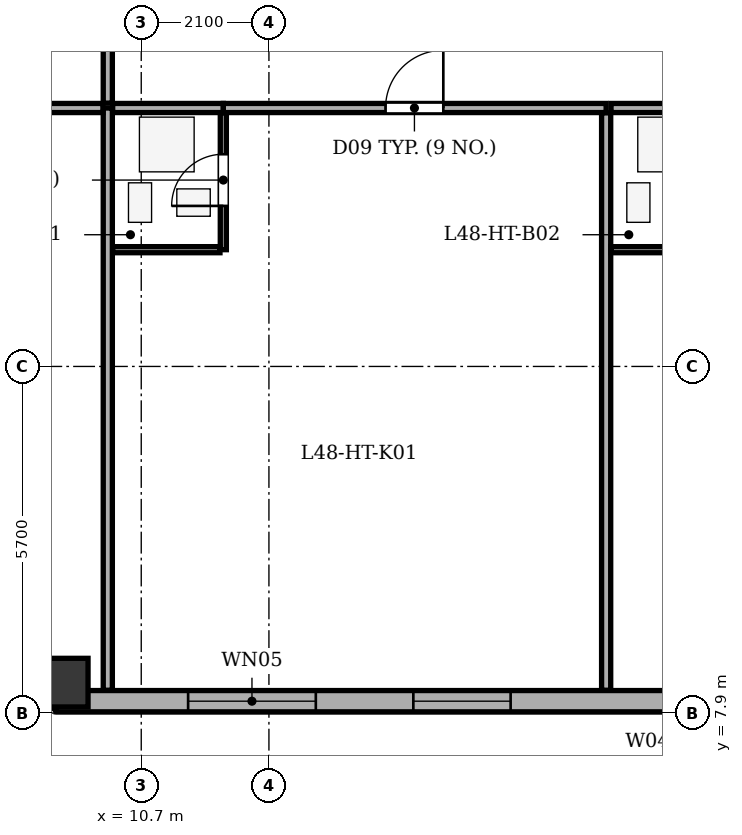
"""IFC4 building model, lengths in metres.
Left out: names, types, materials, properties, quantities, classifications, styles, units other than length and angle.
Written with IfcOpenShell. Run it as: python <this file> out.ifc"""

import sys

from ifc_helpers import new_model, si_unit, direction, frame, frame_2d, origin, origin_2d, place, context, subcontext, project, spatial, rectangle, extrude, element, fill, save


model = new_model("IFC4")
c1 = context("Model", 3, precision=1e-05, world=origin(), true_north=direction((0.0, 1.0)))
c2 = subcontext(c1, "Body", "Model", "MODEL_VIEW")
j1 = project(units=[si_unit("LENGTHUNIT", "METRE"), si_unit("PLANEANGLEUNIT", "RADIAN")], contexts=[c1])
p1 = place(None, origin())
s1 = spatial("IfcSite", under=j1, at=p1, CompositionType="ELEMENT")
p2 = place(p1, origin())
s2 = spatial("IfcBuilding", under=s1, at=p2, CompositionType="ELEMENT")
p3 = place(p2, frame((0.0, 0.0, 186.8)))
s3 = spatial("IfcBuildingStorey", under=s2, at=p3, CompositionType="ELEMENT", Elevation=186.8)
p4 = place(p3, frame((9.3, 8.4, 0.0), z_axis=(0.0, 0.0, 1.0), x_axis=(1.0, 0.0, 0.0)))
e1 = element("IfcColumn", 1, at=p4, inside=s3, PredefinedType="COLUMN", context=c2, shape_type="SweptSolid", body=[
    extrude(rectangle(XDim=0.8, YDim=1.05, at=origin_2d()), origin(), (0.0, 0.0, 1.0), 3.5),
])
p5 = place(p3, frame((44.3, 8.095, 0.0), z_axis=(0.0, 0.0, 1.0), x_axis=(-1.0, 0.0, 0.0)))
e2 = element("IfcWall", 2, at=p5, inside=s3, PredefinedType="STANDARD", context=c2, shape_type="SweptSolid", body=[
    extrude(rectangle(XDim=35.0, YDim=0.35, at=frame_2d((17.5, 0.0))), origin(), (0.0, 0.0, 1.0), 2.785),
])
p6 = place(p5, frame((19.6, 0.0, 0.0)))
e3 = element("IfcOpeningElement", 3, at=p6, cuts=e2, PredefinedType="OPENING", context=c2, shape_type="SweptSolid", body=[
    extrude(rectangle(XDim=1.0, YDim=2.02, at=frame_2d((0.5, 1.01))), frame((0.0, 0.185, 0.0), z_axis=(0.0, -1.0, 0.0), x_axis=(1.0, 0.0, 0.0)), (0.0, 0.0, 1.0), 0.37),
])
p7 = place(p5, frame((1.686, 0.0, 0.75)))
e4 = element("IfcOpeningElement", 4, at=p7, cuts=e2, PredefinedType="OPENING", context=c2, shape_type="SweptSolid", body=[
    extrude(rectangle(XDim=1.6, YDim=1.75, at=frame_2d((0.8, 0.875))), frame((0.0, 0.185, 0.0), z_axis=(0.0, -1.0, 0.0), x_axis=(1.0, 0.0, 0.0)), (0.0, 0.0, 1.0), 0.37),
])
p8 = place(p5, frame((4.843, 0.0, 0.75)))
e5 = element("IfcOpeningElement", 5, at=p8, cuts=e2, PredefinedType="OPENING", context=c2, shape_type="SweptSolid", body=[
    extrude(rectangle(XDim=1.6, YDim=1.75, at=frame_2d((0.8, 0.875))), frame((0.0, 0.185, 0.0), z_axis=(0.0, -1.0, 0.0), x_axis=(1.0, 0.0, 0.0)), (0.0, 0.0, 1.0), 0.37),
])
p9 = place(p5, frame((10.496, 0.0, 0.75)))
e6 = element("IfcOpeningElement", 6, at=p9, cuts=e2, PredefinedType="OPENING", context=c2, shape_type="SweptSolid", body=[
    extrude(rectangle(XDim=1.6, YDim=1.75, at=frame_2d((0.8, 0.875))), frame((0.0, 0.185, 0.0), z_axis=(0.0, -1.0, 0.0), x_axis=(1.0, 0.0, 0.0)), (0.0, 0.0, 1.0), 0.37),
])
p10 = place(p5, frame((13.304, 0.0, 0.75)))
e7 = element("IfcOpeningElement", 7, at=p10, cuts=e2, PredefinedType="OPENING", context=c2, shape_type="SweptSolid", body=[
    extrude(rectangle(XDim=1.6, YDim=1.75, at=frame_2d((0.8, 0.875))), frame((0.0, 0.185, 0.0), z_axis=(0.0, -1.0, 0.0), x_axis=(1.0, 0.0, 0.0)), (0.0, 0.0, 1.0), 0.37),
])
p11 = place(p5, frame((27.525, 0.0, 0.75)))
e8 = element("IfcOpeningElement", 8, at=p11, cuts=e2, PredefinedType="OPENING", context=c2, shape_type="SweptSolid", body=[
    extrude(rectangle(XDim=1.6, YDim=1.75, at=frame_2d((0.8, 0.875))), frame((0.0, 0.185, 0.0), z_axis=(0.0, -1.0, 0.0), x_axis=(1.0, 0.0, 0.0)), (0.0, 0.0, 1.0), 0.37),
])
p12 = place(p5, frame((30.729, 0.0, 0.75)))
e9 = element("IfcOpeningElement", 9, at=p12, cuts=e2, PredefinedType="OPENING", context=c2, shape_type="SweptSolid", body=[
    extrude(rectangle(XDim=2.1, YDim=1.75, at=frame_2d((1.05, 0.875))), frame((0.0, 0.185, 0.0), z_axis=(0.0, -1.0, 0.0), x_axis=(1.0, 0.0, 0.0)), (0.0, 0.0, 1.0), 0.37),
])
p13 = place(p3, frame((9.3, 8.095, 0.0), z_axis=(0.0, 0.0, 1.0), x_axis=(-0.707106781187, 0.707106781187, 0.0)))
e10 = element("IfcWall", 10, at=p13, inside=s3, PredefinedType="STANDARD", context=c2, shape_type="SweptSolid", body=[
    extrude(rectangle(XDim=6.795, YDim=0.35, at=frame_2d((3.397, 0.0))), origin(), (0.0, 0.0, 1.0), 2.785),
])
p14 = place(p13, frame((2.698, 0.0, 0.75)))
e11 = element("IfcOpeningElement", 11, at=p14, cuts=e10, PredefinedType="OPENING", context=c2, shape_type="SweptSolid", body=[
    extrude(rectangle(XDim=1.4, YDim=1.65, at=frame_2d((0.7, 0.825))), frame((0.0, 0.185, 0.0), z_axis=(0.0, -1.0, 0.0), x_axis=(1.0, 0.0, 0.0)), (0.0, 0.0, 1.0), 0.37),
])
p15 = place(p3, frame((10.15, 8.275, 0.0), z_axis=(0.0, 0.0, 1.0), x_axis=(0.0, 1.0, 0.0)))
e12 = element("IfcWall", 12, at=p15, inside=s3, PredefinedType="PARTITIONING", context=c2, shape_type="SweptSolid", body=[
    extrude(rectangle(XDim=9.575, YDim=0.15, at=frame_2d((4.788, 0.0))), origin(), (0.0, 0.0, 1.0), 3.2),
])
p16 = place(p3, frame((10.23, 17.85, 0.0), z_axis=(0.0, 0.0, 1.0), x_axis=(1.0, 0.0, 0.0)))
e13 = element("IfcWall", 13, at=p16, inside=s3, PredefinedType="PARTITIONING", context=c2, shape_type="SweptSolid", body=[
    extrude(rectangle(XDim=1.82, YDim=0.15, at=frame_2d((0.91, 0.0))), origin(), (0.0, 0.0, 1.0), 3.2),
])
p17 = place(p3, frame((12.05, 17.85, 0.0), z_axis=(0.0, 0.0, 1.0), x_axis=(1.0, 0.0, 0.0)))
e14 = element("IfcWall", 14, at=p17, inside=s3, PredefinedType="PARTITIONING", context=c2, shape_type="SweptSolid", body=[
    extrude(rectangle(XDim=6.296, YDim=0.15, at=frame_2d((3.148, 0.0))), origin(), (0.0, 0.0, 1.0), 3.2),
])
p18 = place(p17, frame((2.668, 0.0, 0.0)))
e15 = element("IfcOpeningElement", 15, at=p18, cuts=e14, PredefinedType="OPENING", context=c2, shape_type="SweptSolid", body=[
    extrude(rectangle(XDim=0.95, YDim=2.1, at=frame_2d((0.475, 1.05))), frame((0.0, 0.085, 0.0), z_axis=(0.0, -1.0, 0.0), x_axis=(1.0, 0.0, 0.0)), (0.0, 0.0, 1.0), 0.17),
])
p19 = place(p3, frame((12.05, 15.52, 0.0), z_axis=(0.0, 0.0, 1.0), x_axis=(0.0, 1.0, 0.0)))
e16 = element("IfcWall", 16, at=p19, inside=s3, PredefinedType="PARTITIONING", context=c2, shape_type="SweptSolid", body=[
    extrude(rectangle(XDim=2.25, YDim=0.1, at=frame_2d((1.125, 0.0))), origin(), (0.0, 0.0, 1.0), 3.2),
])
p20 = place(p19, frame((0.72, 0.0, 0.0)))
e17 = element("IfcOpeningElement", 17, at=p20, cuts=e16, PredefinedType="OPENING", context=c2, shape_type="SweptSolid", body=[
    extrude(rectangle(XDim=0.85, YDim=2.05, at=frame_2d((0.425, 1.025))), frame((0.0, 0.06, 0.0), z_axis=(0.0, -1.0, 0.0), x_axis=(1.0, 0.0, 0.0)), (0.0, 0.0, 1.0), 0.12),
])
p21 = place(p3, frame((10.23, 15.52, 0.0), z_axis=(0.0, 0.0, 1.0), x_axis=(1.0, 0.0, 0.0)))
e18 = element("IfcWall", 18, at=p21, inside=s3, PredefinedType="PARTITIONING", context=c2, shape_type="SweptSolid", body=[
    extrude(rectangle(XDim=1.765, YDim=0.1, at=frame_2d((0.883, 0.0))), origin(), (0.0, 0.0, 1.0), 3.2),
])
p22 = place(p3, frame((18.346, 8.275, 0.0), z_axis=(0.0, 0.0, 1.0), x_axis=(0.0, 1.0, 0.0)))
e19 = element("IfcWall", 19, at=p22, inside=s3, PredefinedType="PARTITIONING", context=c2, shape_type="SweptSolid", body=[
    extrude(rectangle(XDim=9.495, YDim=0.15, at=frame_2d((4.748, 0.0))), origin(), (0.0, 0.0, 1.0), 3.2),
])
p23 = place(p3, frame((18.426, 17.85, 0.0), z_axis=(0.0, 0.0, 1.0), x_axis=(1.0, 0.0, 0.0)))
e20 = element("IfcWall", 20, at=p23, inside=s3, PredefinedType="PARTITIONING", context=c2, shape_type="SweptSolid", body=[
    extrude(rectangle(XDim=1.82, YDim=0.15, at=frame_2d((0.91, 0.0))), origin(), (0.0, 0.0, 1.0), 3.2),
])
p24 = place(p3, frame((18.426, 15.52, 0.0), z_axis=(0.0, 0.0, 1.0), x_axis=(1.0, 0.0, 0.0)))
e21 = element("IfcWall", 21, at=p24, inside=s3, PredefinedType="PARTITIONING", context=c2, shape_type="SweptSolid", body=[
    extrude(rectangle(XDim=1.765, YDim=0.1, at=frame_2d((0.882, 0.0))), origin(), (0.0, 0.0, 1.0), 3.2),
])
p25 = place(p3, frame((4.675, 17.85, 0.0), z_axis=(0.0, 0.0, 1.0), x_axis=(1.0, 0.0, 0.0)))
e22 = element("IfcWall", 22, at=p25, inside=s3, PredefinedType="PARTITIONING", context=c2, shape_type="SweptSolid", body=[
    extrude(rectangle(XDim=5.395, YDim=0.15, at=frame_2d((2.698, 0.0))), origin(), (0.0, 0.0, 1.0), 3.2),
])
p26 = place(p3, frame((10.15, 17.93, 0.0), z_axis=(0.0, 0.0, 1.0), x_axis=(0.0, 1.0, 0.0)))
e23 = element("IfcWall", 23, at=p26, inside=s3, PredefinedType="PARTITIONING", context=c2, shape_type="SweptSolid", body=[
    extrude(rectangle(XDim=18.54, YDim=0.15, at=frame_2d((9.27, 0.0))), origin(), (0.0, 0.0, 1.0), 3.2),
])
p27 = place(p26, frame((8.79, 0.0, 0.0)))
e24 = element("IfcOpeningElement", 24, at=p27, cuts=e23, PredefinedType="OPENING", context=c2, shape_type="SweptSolid", body=[
    extrude(rectangle(XDim=0.95, YDim=2.1, at=frame_2d((0.475, 1.05))), frame((0.0, 0.085, 0.0), z_axis=(0.0, -1.0, 0.0), x_axis=(1.0, 0.0, 0.0)), (0.0, 0.0, 1.0), 0.17),
])
p28 = place(p11, origin())
e25 = element("IfcWindow", 25, at=p28, inside=s3, PartitioningType="SINGLE_PANEL", PredefinedType="WINDOW", context=c2, shape_type="SweptSolid", body=[
    extrude(rectangle(XDim=1.6, YDim=1.75, at=frame_2d((0.8, 0.875))), frame((0.0, -0.01, 0.0), z_axis=(0.0, -1.0, 0.0), x_axis=(1.0, 0.0, 0.0)), (0.0, 0.0, 1.0), 0.06),
])
fill(e8, e25)
p29 = place(p12, origin())
e26 = element("IfcWindow", 26, at=p29, inside=s3, PartitioningType="SINGLE_PANEL", PredefinedType="WINDOW", context=c2, shape_type="SweptSolid", body=[
    extrude(rectangle(XDim=2.1, YDim=1.75, at=frame_2d((1.05, 0.875))), frame((0.0, -0.01, 0.0), z_axis=(0.0, -1.0, 0.0), x_axis=(1.0, 0.0, 0.0)), (0.0, 0.0, 1.0), 0.06),
])
fill(e9, e26)
p30 = place(p20, origin())
e27 = element("IfcDoor", 27, at=p30, inside=s3, OperationType="SINGLE_SWING_LEFT", PredefinedType="DOOR", context=c2, shape_type="SweptSolid", body=[
    extrude(rectangle(XDim=0.85, YDim=2.05, at=frame_2d((0.425, 1.025))), frame((0.0, 0.025, 0.0), z_axis=(0.0, -1.0, 0.0), x_axis=(1.0, 0.0, 0.0)), (0.0, 0.0, 1.0), 0.05),
])
fill(e17, e27)
p31 = place(p18, origin())
e28 = element("IfcDoor", 28, at=p31, inside=s3, OperationType="SINGLE_SWING_RIGHT", PredefinedType="DOOR", context=c2, shape_type="SweptSolid", body=[
    extrude(rectangle(XDim=0.95, YDim=2.1, at=frame_2d((0.475, 1.05))), frame((0.0, 0.025, 0.0), z_axis=(0.0, -1.0, 0.0), x_axis=(1.0, 0.0, 0.0)), (0.0, 0.0, 1.0), 0.05),
])
fill(e15, e28)
save(model, sys.argv[1])
